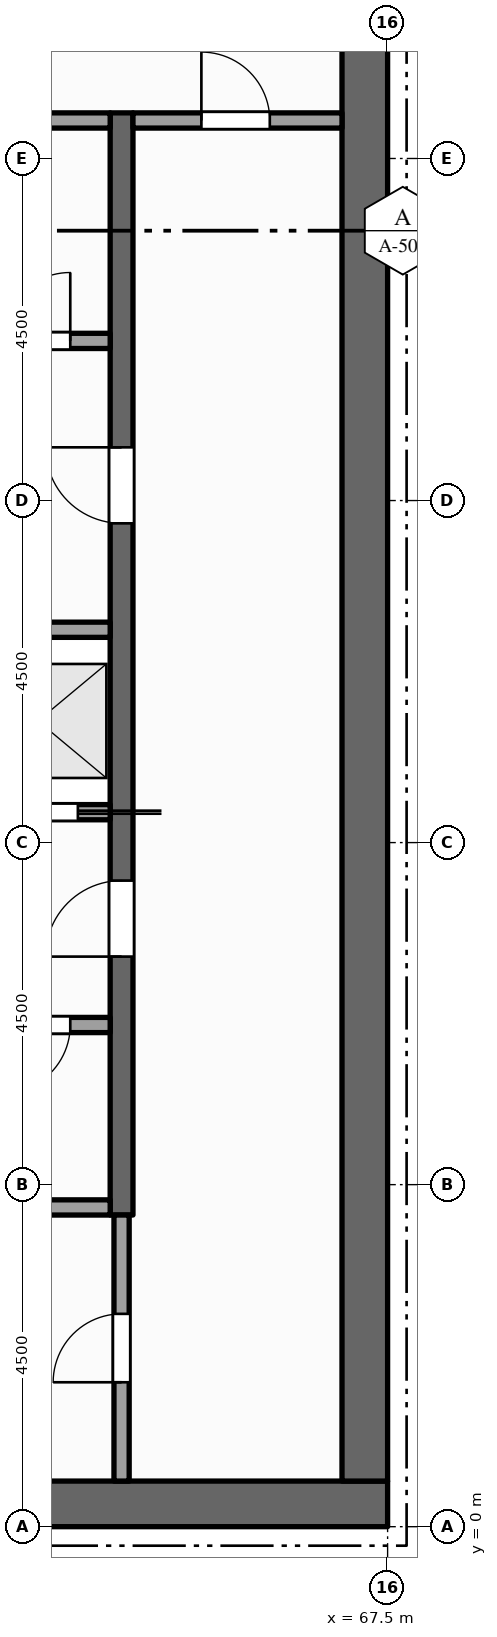
"""IFC4 building model, lengths in metres.
Left out: names, types, materials, properties, quantities, classifications, styles, units other than length and angle.
Written with IfcOpenShell. Run it as: python <this file> out.ifc"""

import sys

from ifc_helpers import new_model, si_unit, direction, frame, frame_2d, origin, place, context, subcontext, project, spatial, rectangle, extrude, element, fill, save


model = new_model("IFC4")
c1 = context("Model", 3, precision=1e-05, world=origin(), true_north=direction((0.0, 1.0)))
c2 = subcontext(c1, "Body", "Model", "MODEL_VIEW")
j1 = project(units=[si_unit("LENGTHUNIT", "METRE"), si_unit("PLANEANGLEUNIT", "RADIAN")], contexts=[c1])
p1 = place(None, origin())
s1 = spatial("IfcSite", under=j1, at=p1, CompositionType="ELEMENT")
p2 = place(p1, origin())
s2 = spatial("IfcBuilding", under=s1, at=p2, CompositionType="ELEMENT")
p3 = place(p2, frame((0.0, 0.0, 314.0)))
s3 = spatial("IfcBuildingStorey", under=s2, at=p3, CompositionType="ELEMENT", Elevation=314.0)
p4 = place(p3, frame((67.5, 0.3, -0.15), z_axis=(0.0, 0.0, 1.0), x_axis=(-1.0, 0.0, 0.0)))
e1 = element("IfcWall", 1, at=p4, inside=s3, PredefinedType="SHEAR", context=c2, shape_type="SweptSolid", body=[
    extrude(rectangle(XDim=13.5, YDim=0.6, at=frame_2d((6.75, 0.0))), origin(), (0.0, 0.0, 1.0), 4.5),
])
p5 = place(p3, frame((67.2, 0.6, -0.15), z_axis=(0.0, 0.0, 1.0), x_axis=(0.0, 1.0, 0.0)))
e2 = element("IfcWall", 2, at=p5, inside=s3, PredefinedType="SHEAR", context=c2, shape_type="SweptSolid", body=[
    extrude(rectangle(XDim=21.3, YDim=0.6, at=frame_2d((10.65, 0.0))), origin(), (0.0, 0.0, 1.0), 4.5),
])
p6 = place(p3, frame((64.0, 0.6, 0.0), z_axis=(0.0, 0.0, 1.0), x_axis=(0.0, 1.0, 0.0)))
e3 = element("IfcWall", 3, at=p6, inside=s3, PredefinedType="PARTITIONING", context=c2, shape_type="SweptSolid", body=[
    extrude(rectangle(XDim=3.5, YDim=0.2, at=frame_2d((1.75, 0.0))), origin(), (0.0, 0.0, 1.0), 4.35),
])
p7 = place(p6, frame((1.3, 0.0, 0.0)))
e4 = element("IfcOpeningElement", 4, at=p7, cuts=e3, PredefinedType="OPENING", context=c2, shape_type="SweptSolid", body=[
    extrude(rectangle(XDim=0.9, YDim=2.1, at=frame_2d((0.45, 1.05))), frame((0.0, 0.11, 0.0), z_axis=(0.0, -1.0, 0.0), x_axis=(1.0, 0.0, 0.0)), (0.0, 0.0, 1.0), 0.22),
])
p8 = place(p3, frame((64.0, 4.1, 0.0), z_axis=(0.0, 0.0, 1.0), x_axis=(0.0, 1.0, 0.0)))
e5 = element("IfcWall", 5, at=p8, inside=s3, PredefinedType="SHEAR", context=c2, shape_type="SweptSolid", body=[
    extrude(rectangle(XDim=14.5, YDim=0.3, at=frame_2d((7.25, 0.0))), origin(), (0.0, 0.0, 1.0), 4.35),
])
p9 = place(p8, frame((3.4, 0.0, 0.0)))
e6 = element("IfcOpeningElement", 6, at=p9, cuts=e5, PredefinedType="OPENING", context=c2, shape_type="SweptSolid", body=[
    extrude(rectangle(XDim=1.0, YDim=2.1, at=frame_2d((0.5, 1.05))), frame((0.0, 0.16, 0.0), z_axis=(0.0, -1.0, 0.0), x_axis=(1.0, 0.0, 0.0)), (0.0, 0.0, 1.0), 0.32),
])
p10 = place(p8, frame((9.1, 0.0, 0.0)))
e7 = element("IfcOpeningElement", 7, at=p10, cuts=e5, PredefinedType="OPENING", context=c2, shape_type="SweptSolid", body=[
    extrude(rectangle(XDim=1.0, YDim=2.1, at=frame_2d((0.5, 1.05))), frame((0.0, 0.16, 0.0), z_axis=(0.0, -1.0, 0.0), x_axis=(1.0, 0.0, 0.0)), (0.0, 0.0, 1.0), 0.32),
])
p11 = place(p3, frame((61.9, 4.2, 0.0), z_axis=(0.0, 0.0, 1.0), x_axis=(1.0, 0.0, 0.0)))
e8 = element("IfcWall", 8, at=p11, inside=s3, PredefinedType="PARTITIONING", context=c2, shape_type="SweptSolid", body=[
    extrude(rectangle(XDim=1.95, YDim=0.2, at=frame_2d((0.975, 0.0))), origin(), (0.0, 0.0, 1.0), 4.35),
])
p12 = place(p3, frame((61.9, 6.6, 0.0), z_axis=(0.0, 0.0, 1.0), x_axis=(1.0, 0.0, 0.0)))
e9 = element("IfcWall", 9, at=p12, inside=s3, PredefinedType="PARTITIONING", context=c2, shape_type="SweptSolid", body=[
    extrude(rectangle(XDim=1.95, YDim=0.2, at=frame_2d((0.975, 0.0))), origin(), (0.0, 0.0, 1.0), 4.35),
])
p13 = place(p12, frame((0.525, 0.0, 0.0)))
e10 = element("IfcOpeningElement", 10, at=p13, cuts=e9, PredefinedType="OPENING", context=c2, shape_type="SweptSolid", body=[
    extrude(rectangle(XDim=0.9, YDim=2.1, at=frame_2d((0.45, 1.05))), frame((0.0, 0.11, 0.0), z_axis=(0.0, -1.0, 0.0), x_axis=(1.0, 0.0, 0.0)), (0.0, 0.0, 1.0), 0.22),
])
p14 = place(p3, frame((61.9, 9.4, 0.0), z_axis=(0.0, 0.0, 1.0), x_axis=(1.0, 0.0, 0.0)))
e11 = element("IfcWall", 11, at=p14, inside=s3, PredefinedType="SOLIDWALL", context=c2, shape_type="SweptSolid", body=[
    extrude(rectangle(XDim=1.95, YDim=0.2, at=frame_2d((0.975, 0.0))), origin(), (0.0, 0.0, 1.0), 4.35),
])
p15 = place(p14, frame((0.425, 0.0, 0.012)))
e12 = element("IfcOpeningElement", 12, at=p15, cuts=e11, PredefinedType="OPENING", context=c2, shape_type="SweptSolid", body=[
    extrude(rectangle(XDim=1.1, YDim=2.1, at=frame_2d((0.55, 1.05))), frame((0.0, 0.11, 0.0), z_axis=(0.0, -1.0, 0.0), x_axis=(1.0, 0.0, 0.0)), (0.0, 0.0, 1.0), 0.22),
])
p16 = place(p3, frame((61.9, 11.8, 0.0), z_axis=(0.0, 0.0, 1.0), x_axis=(1.0, 0.0, 0.0)))
e13 = element("IfcWall", 13, at=p16, inside=s3, PredefinedType="SOLIDWALL", context=c2, shape_type="SweptSolid", body=[
    extrude(rectangle(XDim=1.95, YDim=0.2, at=frame_2d((0.975, 0.0))), origin(), (0.0, 0.0, 1.0), 4.35),
])
p17 = place(p3, frame((61.9, 15.6, 0.0), z_axis=(0.0, 0.0, 1.0), x_axis=(1.0, 0.0, 0.0)))
e14 = element("IfcWall", 14, at=p17, inside=s3, PredefinedType="PARTITIONING", context=c2, shape_type="SweptSolid", body=[
    extrude(rectangle(XDim=1.95, YDim=0.2, at=frame_2d((0.975, 0.0))), origin(), (0.0, 0.0, 1.0), 4.35),
])
p18 = place(p17, frame((0.525, 0.0, 0.0)))
e15 = element("IfcOpeningElement", 15, at=p18, cuts=e14, PredefinedType="OPENING", context=c2, shape_type="SweptSolid", body=[
    extrude(rectangle(XDim=0.9, YDim=2.1, at=frame_2d((0.45, 1.05))), frame((0.0, 0.11, 0.0), z_axis=(0.0, -1.0, 0.0), x_axis=(1.0, 0.0, 0.0)), (0.0, 0.0, 1.0), 0.22),
])
p19 = place(p3, frame((61.9, 18.5, 0.0), z_axis=(0.0, 0.0, 1.0), x_axis=(1.0, 0.0, 0.0)))
e16 = element("IfcWall", 16, at=p19, inside=s3, PredefinedType="PARTITIONING", context=c2, shape_type="SweptSolid", body=[
    extrude(rectangle(XDim=1.95, YDim=0.2, at=frame_2d((0.975, 0.0))), origin(), (0.0, 0.0, 1.0), 4.35),
])
p20 = place(p3, frame((64.15, 18.5, 0.0), z_axis=(0.0, 0.0, 1.0), x_axis=(1.0, 0.0, 0.0)))
e17 = element("IfcWall", 17, at=p20, inside=s3, PredefinedType="PARTITIONING", context=c2, shape_type="SweptSolid", body=[
    extrude(rectangle(XDim=2.75, YDim=0.2, at=frame_2d((1.375, 0.0))), origin(), (0.0, 0.0, 1.0), 4.35),
])
p21 = place(p20, frame((0.9, 0.0, 0.0)))
e18 = element("IfcOpeningElement", 18, at=p21, cuts=e17, PredefinedType="OPENING", context=c2, shape_type="SweptSolid", body=[
    extrude(rectangle(XDim=0.9, YDim=2.1, at=frame_2d((0.45, 1.05))), frame((0.0, 0.11, 0.0), z_axis=(0.0, -1.0, 0.0), x_axis=(1.0, 0.0, 0.0)), (0.0, 0.0, 1.0), 0.22),
])
p22 = place(p15, origin())
e19 = element("IfcDoor", 19, at=p22, inside=s3, OperationType="SLIDING_TO_RIGHT", PredefinedType="DOOR", context=c2, shape_type="SweptSolid", body=[
    extrude(rectangle(XDim=1.1, YDim=2.1, at=frame_2d((0.55, 1.05))), frame((0.0, 0.025, 0.0), z_axis=(0.0, -1.0, 0.0), x_axis=(1.0, 0.0, 0.0)), (0.0, 0.0, 1.0), 0.05),
])
fill(e12, e19)
p23 = place(p9, origin())
e20 = element("IfcDoor", 20, at=p23, inside=s3, OperationType="SINGLE_SWING_LEFT", PredefinedType="DOOR", context=c2, shape_type="SweptSolid", body=[
    extrude(rectangle(XDim=1.0, YDim=2.1, at=frame_2d((0.5, 1.05))), frame((0.0, 0.025, 0.0), z_axis=(0.0, -1.0, 0.0), x_axis=(1.0, 0.0, 0.0)), (0.0, 0.0, 1.0), 0.05),
])
fill(e6, e20)
p24 = place(p10, origin())
e21 = element("IfcDoor", 21, at=p24, inside=s3, OperationType="SINGLE_SWING_RIGHT", PredefinedType="DOOR", context=c2, shape_type="SweptSolid", body=[
    extrude(rectangle(XDim=1.0, YDim=2.1, at=frame_2d((0.5, 1.05))), frame((0.0, 0.025, 0.0), z_axis=(0.0, -1.0, 0.0), x_axis=(1.0, 0.0, 0.0)), (0.0, 0.0, 1.0), 0.05),
])
fill(e7, e21)
p25 = place(p7, origin())
e22 = element("IfcDoor", 22, at=p25, inside=s3, OperationType="SINGLE_SWING_LEFT", PredefinedType="DOOR", context=c2, shape_type="SweptSolid", body=[
    extrude(rectangle(XDim=0.9, YDim=2.1, at=frame_2d((0.45, 1.05))), frame((0.0, 0.025, 0.0), z_axis=(0.0, -1.0, 0.0), x_axis=(1.0, 0.0, 0.0)), (0.0, 0.0, 1.0), 0.05),
])
fill(e4, e22)
p26 = place(p21, origin())
e23 = element("IfcDoor", 23, at=p26, inside=s3, OperationType="SINGLE_SWING_LEFT", PredefinedType="DOOR", context=c2, shape_type="SweptSolid", body=[
    extrude(rectangle(XDim=0.9, YDim=2.1, at=frame_2d((0.45, 1.05))), frame((0.0, 0.025, 0.0), z_axis=(0.0, -1.0, 0.0), x_axis=(1.0, 0.0, 0.0)), (0.0, 0.0, 1.0), 0.05),
])
fill(e18, e23)
p27 = place(p13, origin())
e24 = element("IfcDoor", 24, at=p27, inside=s3, OperationType="SINGLE_SWING_LEFT", PredefinedType="DOOR", context=c2, shape_type="SweptSolid", body=[
    extrude(rectangle(XDim=0.9, YDim=2.1, at=frame_2d((0.45, 1.05))), frame((0.0, 0.025, 0.0), z_axis=(0.0, -1.0, 0.0), x_axis=(1.0, 0.0, 0.0)), (0.0, 0.0, 1.0), 0.05),
])
fill(e10, e24)
p28 = place(p18, origin())
e25 = element("IfcDoor", 25, at=p28, inside=s3, OperationType="SINGLE_SWING_RIGHT", PredefinedType="DOOR", context=c2, shape_type="SweptSolid", body=[
    extrude(rectangle(XDim=0.9, YDim=2.1, at=frame_2d((0.45, 1.05))), frame((0.0, 0.025, 0.0), z_axis=(0.0, -1.0, 0.0), x_axis=(1.0, 0.0, 0.0)), (0.0, 0.0, 1.0), 0.05),
])
fill(e15, e25)
save(model, sys.argv[1])
